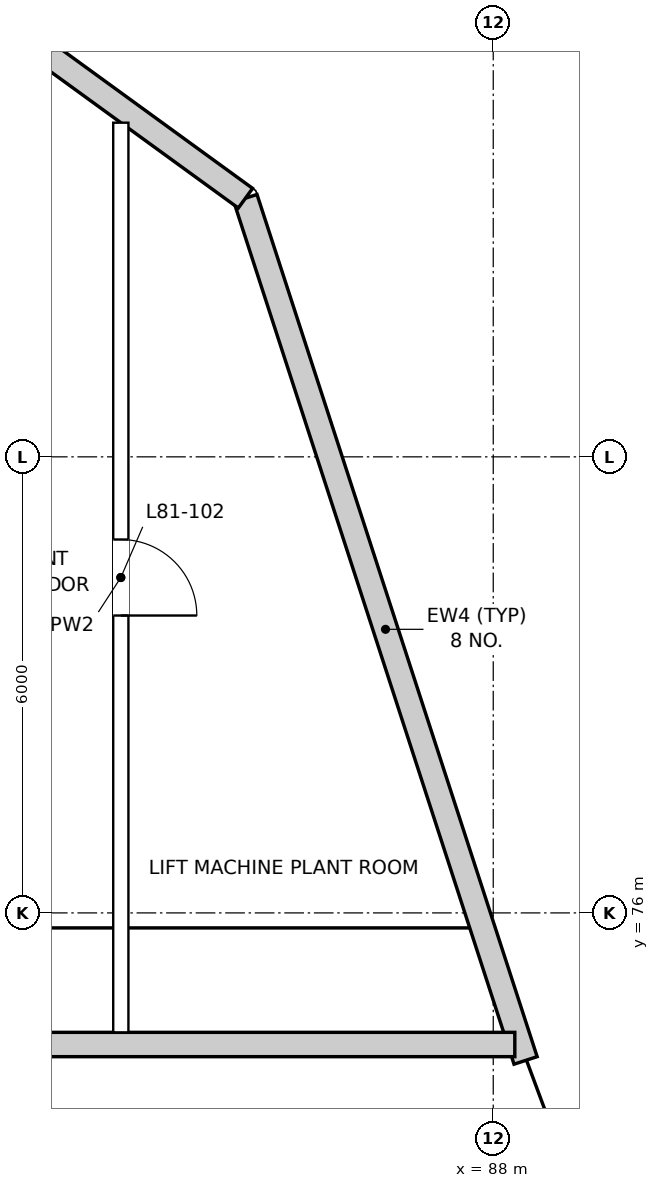
"""IFC4 building model, lengths in metres.
Left out: names, types, materials, properties, quantities, classifications, styles, units other than length and angle.
Written with IfcOpenShell. Run it as: python <this file> out.ifc"""

import sys

from ifc_helpers import new_model, si_unit, direction, frame, frame_2d, origin, place, context, subcontext, project, spatial, polyline, rectangle, outline, extrude, element, fill, save


model = new_model("IFC4")
c1 = context("Model", 3, precision=1e-05, world=origin(), true_north=direction((0.0, 1.0)))
c2 = subcontext(c1, "Body", "Model", "MODEL_VIEW")
j1 = project(units=[si_unit("LENGTHUNIT", "METRE"), si_unit("PLANEANGLEUNIT", "RADIAN")], contexts=[c1])
p1 = place(None, origin())
s1 = spatial("IfcSite", under=j1, at=p1, CompositionType="ELEMENT")
p2 = place(p1, origin())
s2 = spatial("IfcBuilding", under=s1, at=p2, CompositionType="ELEMENT")
p3 = place(p2, frame((0.0, 0.0, 346.7)))
s3 = spatial("IfcBuildingStorey", under=s2, at=p3, CompositionType="ELEMENT", Elevation=346.7)
p4 = place(p3, frame((88.426, 74.059, 0.0), z_axis=(0.0, 0.0, 1.0), x_axis=(-0.309021736923, 0.951054975335, 0.0)))
e1 = element("IfcWall", 1, at=p4, inside=s3, PredefinedType="SOLIDWALL", context=c2, shape_type="SweptSolid", body=[
    extrude(outline(polyline([(0.0, 0.0), (11.927, 0.0), (11.927, 4.2), (1.833, 4.2), (0.0, 2.656), (0.0, 0.0)])), frame((0.0, 0.16, 0.0), z_axis=(0.0, -1.0, 0.0), x_axis=(1.0, 0.0, 0.0)), (0.0, 0.0, 1.0), 0.32),
])
p5 = place(p3, frame((84.74, 85.403, 0.0), z_axis=(0.0, 0.0, 1.0), x_axis=(-0.80900078054, 0.587807568074, 0.0)))
e2 = element("IfcWall", 2, at=p5, inside=s3, PredefinedType="SOLIDWALL", context=c2, shape_type="SweptSolid", body=[
    extrude(rectangle(XDim=4.147, YDim=0.32, at=frame_2d((2.073, 0.0))), origin(), (0.0, 0.0, 1.0), 4.2),
])
p6 = place(p3, frame((81.0, 74.269, 0.0), z_axis=(0.0, 0.0, 1.0), x_axis=(1.0, 0.0, 0.0)))
e3 = element("IfcWall", 3, at=p6, inside=s3, PredefinedType="SOLIDWALL", context=c2, shape_type="SweptSolid", body=[
    extrude(rectangle(XDim=7.284, YDim=0.32, at=frame_2d((3.642, 0.0))), origin(), (0.0, 0.0, 1.0), 2.842),
])
p7 = place(p3, frame((83.1, 86.396, 0.0), z_axis=(0.0, 0.0, 1.0), x_axis=(0.0, -1.0, 0.0)))
e4 = element("IfcWall", 4, at=p7, inside=s3, PredefinedType="PARTITIONING", context=c2, shape_type="SweptSolid", body=[
    extrude(outline(polyline([(0.0, 0.0), (11.968, 0.0), (11.968, 2.833), (0.0, 3.75), (0.0, 0.0)])), frame((0.0, 0.1, 0.0), z_axis=(0.0, -1.0, 0.0), x_axis=(1.0, 0.0, 0.0)), (0.0, 0.0, 1.0), 0.2),
])
p8 = place(p7, frame((5.484, 0.0, 0.0)))
e5 = element("IfcOpeningElement", 5, at=p8, cuts=e4, PredefinedType="OPENING", context=c2, shape_type="SweptSolid", body=[
    extrude(rectangle(XDim=1.0, YDim=2.1, at=frame_2d((0.5, 1.05))), frame((0.0, 0.11, 0.0), z_axis=(0.0, -1.0, 0.0), x_axis=(1.0, 0.0, 0.0)), (0.0, 0.0, 1.0), 0.22),
])
p9 = place(p8, origin())
e6 = element("IfcDoor", 6, at=p9, inside=s3, OperationType="SINGLE_SWING_RIGHT", PredefinedType="DOOR", context=c2, shape_type="SweptSolid", body=[
    extrude(rectangle(XDim=1.0, YDim=2.1, at=frame_2d((0.5, 1.05))), frame((0.0, 0.025, 0.0), z_axis=(0.0, -1.0, 0.0), x_axis=(1.0, 0.0, 0.0)), (0.0, 0.0, 1.0), 0.05),
])
fill(e5, e6)
save(model, sys.argv[1])
